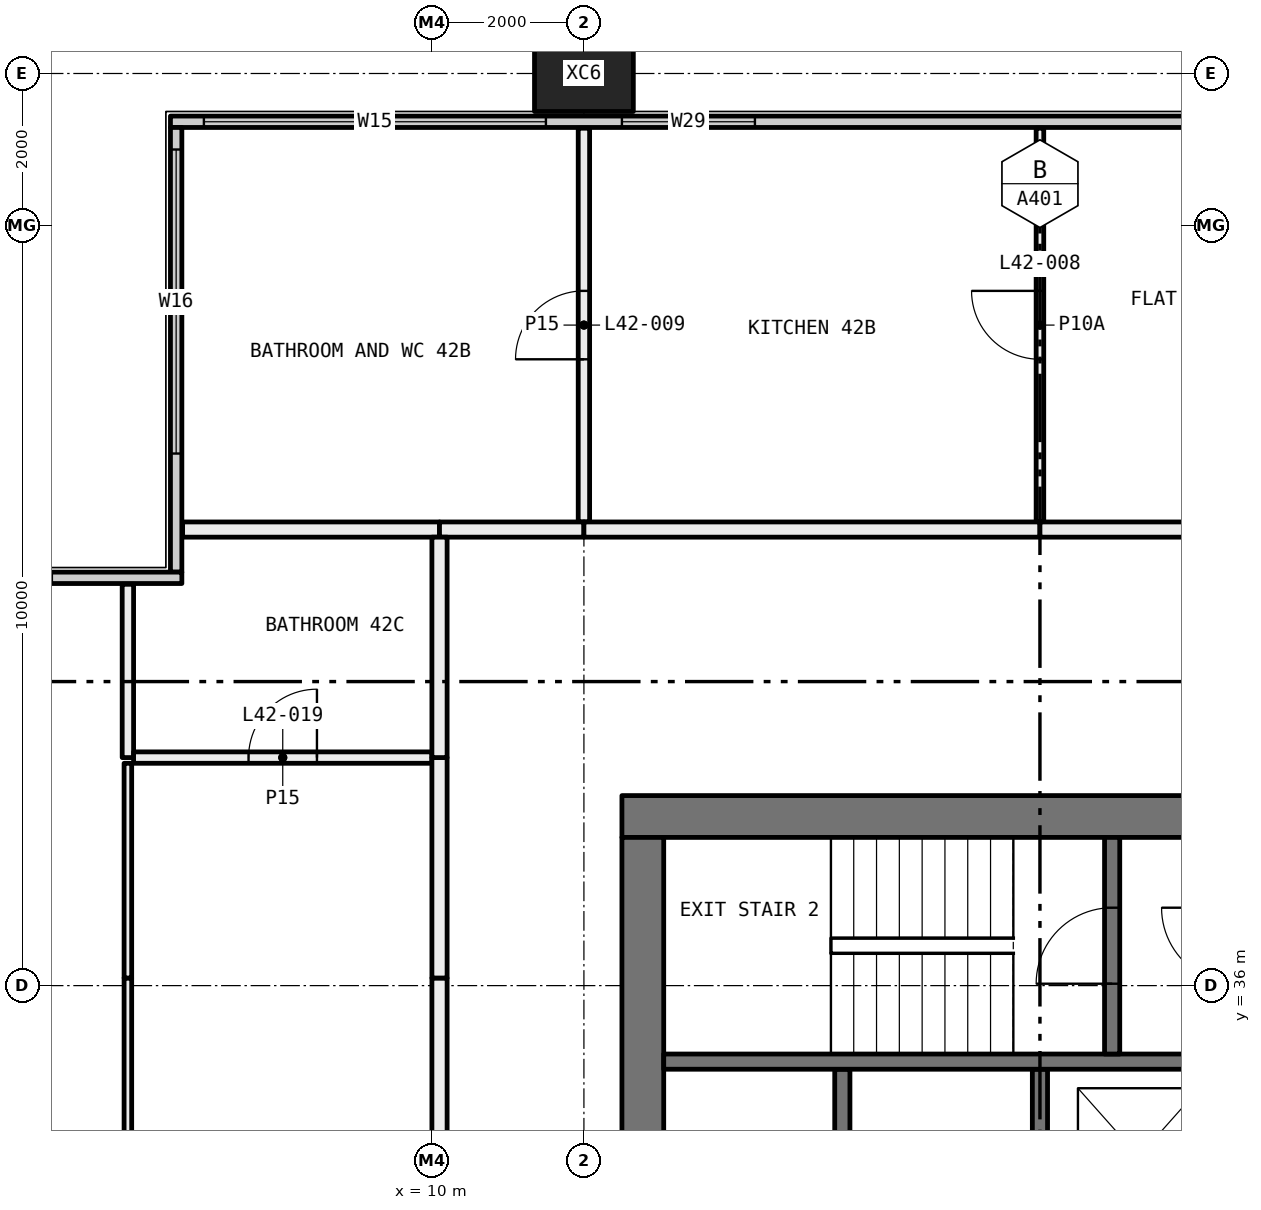
"""IFC4 building model, lengths in metres.
Left out: names, types, materials, properties, quantities, classifications, styles, units other than length and angle.
Written with IfcOpenShell. Run it as: python <this file> out.ifc"""

import sys

from ifc_helpers import new_model, si_unit, direction, frame, frame_2d, origin, origin_2d, place, context, subcontext, project, spatial, rectangle, hollow_rectangle, extrude, element, fill, save


model = new_model("IFC4")
c1 = context("Model", 3, precision=1e-05, world=origin(), true_north=direction((0.0, 1.0)))
c2 = subcontext(c1, "Body", "Model", "MODEL_VIEW")
j1 = project(units=[si_unit("LENGTHUNIT", "METRE"), si_unit("PLANEANGLEUNIT", "RADIAN")], contexts=[c1])
p1 = place(None, origin())
s1 = spatial("IfcSite", under=j1, at=p1, CompositionType="ELEMENT")
p2 = place(p1, origin())
s2 = spatial("IfcBuilding", under=s1, at=p2, CompositionType="ELEMENT")
p3 = place(p2, frame((0.0, 0.0, 161.7)))
s3 = spatial("IfcBuildingStorey", under=s2, at=p3, CompositionType="ELEMENT", Elevation=161.7)
p4 = place(p3, frame((12.0, 48.0, -0.4), z_axis=(0.0, 0.0, 1.0), x_axis=(1.0, 0.0, 0.0)))
e1 = element("IfcColumn", 1, at=p4, inside=s3, PredefinedType="COLUMN", context=c2, shape_type="SweptSolid", body=[
    extrude(hollow_rectangle(XDim=1.3, YDim=1.0, WallThickness=0.05, at=origin_2d()), origin(), (0.0, 0.0, 1.0), 3.45),
])
p5 = place(p3, frame((6.56, 47.365, 0.0), z_axis=(0.0, 0.0, 1.0), x_axis=(1.0, 0.0, 0.0)))
e2 = element("IfcWall", 2, at=p5, inside=s3, PredefinedType="ELEMENTEDWALL", context=c2, shape_type="SweptSolid", body=[
    extrude(rectangle(XDim=46.88, YDim=0.15, at=frame_2d((23.44, 0.0))), origin(), (0.0, 0.0, 1.0), 3.05),
])
p6 = place(p5, frame((0.44, 0.0, 0.45)))
e3 = element("IfcOpeningElement", 3, at=p6, cuts=e2, PredefinedType="OPENING", context=c2, shape_type="SweptSolid", body=[
    extrude(rectangle(XDim=4.5, YDim=2.55, at=frame_2d((2.25, 1.275))), frame((0.0, 0.085, 0.0), z_axis=(0.0, -1.0, 0.0), x_axis=(1.0, 0.0, 0.0)), (0.0, 0.0, 1.0), 0.17),
])
p7 = place(p5, frame((5.94, 0.0, 0.45)))
e4 = element("IfcOpeningElement", 4, at=p7, cuts=e2, PredefinedType="OPENING", context=c2, shape_type="SweptSolid", body=[
    extrude(rectangle(XDim=1.75, YDim=2.55, at=frame_2d((0.875, 1.275))), frame((0.0, 0.085, 0.0), z_axis=(0.0, -1.0, 0.0), x_axis=(1.0, 0.0, 0.0)), (0.0, 0.0, 1.0), 0.17),
])
p8 = place(p5, frame((15.19, 0.0, 0.45)))
e5 = element("IfcOpeningElement", 5, at=p8, cuts=e2, PredefinedType="OPENING", context=c2, shape_type="SweptSolid", body=[
    extrude(rectangle(XDim=1.75, YDim=2.55, at=frame_2d((0.875, 1.275))), frame((0.0, 0.085, 0.0), z_axis=(0.0, -1.0, 0.0), x_axis=(1.0, 0.0, 0.0)), (0.0, 0.0, 1.0), 0.17),
])
p9 = place(p5, frame((17.94, 0.0, 0.45)))
e6 = element("IfcOpeningElement", 6, at=p9, cuts=e2, PredefinedType="OPENING", context=c2, shape_type="SweptSolid", body=[
    extrude(rectangle(XDim=1.75, YDim=2.55, at=frame_2d((0.875, 1.275))), frame((0.0, 0.085, 0.0), z_axis=(0.0, -1.0, 0.0), x_axis=(1.0, 0.0, 0.0)), (0.0, 0.0, 1.0), 0.17),
])
p10 = place(p5, frame((27.19, 0.0, 0.45)))
e7 = element("IfcOpeningElement", 7, at=p10, cuts=e2, PredefinedType="OPENING", context=c2, shape_type="SweptSolid", body=[
    extrude(rectangle(XDim=1.75, YDim=2.55, at=frame_2d((0.875, 1.275))), frame((0.0, 0.085, 0.0), z_axis=(0.0, -1.0, 0.0), x_axis=(1.0, 0.0, 0.0)), (0.0, 0.0, 1.0), 0.17),
])
p11 = place(p5, frame((29.94, 0.0, 0.45)))
e8 = element("IfcOpeningElement", 8, at=p11, cuts=e2, PredefinedType="OPENING", context=c2, shape_type="SweptSolid", body=[
    extrude(rectangle(XDim=1.75, YDim=2.55, at=frame_2d((0.875, 1.275))), frame((0.0, 0.085, 0.0), z_axis=(0.0, -1.0, 0.0), x_axis=(1.0, 0.0, 0.0)), (0.0, 0.0, 1.0), 0.17),
])
p12 = place(p5, frame((39.19, 0.0, 0.45)))
e9 = element("IfcOpeningElement", 9, at=p12, cuts=e2, PredefinedType="OPENING", context=c2, shape_type="SweptSolid", body=[
    extrude(rectangle(XDim=1.75, YDim=2.55, at=frame_2d((0.875, 1.275))), frame((0.0, 0.085, 0.0), z_axis=(0.0, -1.0, 0.0), x_axis=(1.0, 0.0, 0.0)), (0.0, 0.0, 1.0), 0.17),
])
p13 = place(p5, frame((41.94, 0.0, 0.45)))
e10 = element("IfcOpeningElement", 10, at=p13, cuts=e2, PredefinedType="OPENING", context=c2, shape_type="SweptSolid", body=[
    extrude(rectangle(XDim=4.5, YDim=2.55, at=frame_2d((2.25, 1.275))), frame((0.0, 0.085, 0.0), z_axis=(0.0, -1.0, 0.0), x_axis=(1.0, 0.0, 0.0)), (0.0, 0.0, 1.0), 0.17),
])
p14 = place(p3, frame((6.635, 41.44, 0.0), z_axis=(0.0, 0.0, 1.0), x_axis=(0.0, 1.0, 0.0)))
e11 = element("IfcWall", 11, at=p14, inside=s3, PredefinedType="ELEMENTEDWALL", context=c2, shape_type="SweptSolid", body=[
    extrude(rectangle(XDim=5.85, YDim=0.15, at=frame_2d((2.925, 0.0))), origin(), (0.0, 0.0, 1.0), 3.05),
])
p15 = place(p14, frame((1.56, 0.0, 0.45)))
e12 = element("IfcOpeningElement", 12, at=p15, cuts=e11, PredefinedType="OPENING", context=c2, shape_type="SweptSolid", body=[
    extrude(rectangle(XDim=4.0, YDim=2.55, at=frame_2d((2.0, 1.275))), frame((0.0, 0.085, 0.0), z_axis=(0.0, -1.0, 0.0), x_axis=(1.0, 0.0, 0.0)), (0.0, 0.0, 1.0), 0.17),
])
p16 = place(p3, frame((0.56, 41.365, 0.0), z_axis=(0.0, 0.0, 1.0), x_axis=(1.0, 0.0, 0.0)))
e13 = element("IfcWall", 13, at=p16, inside=s3, PredefinedType="ELEMENTEDWALL", context=c2, shape_type="SweptSolid", body=[
    extrude(rectangle(XDim=6.15, YDim=0.15, at=frame_2d((3.075, 0.0))), origin(), (0.0, 0.0, 1.0), 3.05),
])
p17 = place(p16, frame((0.44, 0.0, 0.45)))
e14 = element("IfcOpeningElement", 14, at=p17, cuts=e13, PredefinedType="OPENING", context=c2, shape_type="SweptSolid", body=[
    extrude(rectangle(XDim=4.0, YDim=2.55, at=frame_2d((2.0, 1.275))), frame((0.0, 0.085, 0.0), z_axis=(0.0, -1.0, 0.0), x_axis=(1.0, 0.0, 0.0)), (0.0, 0.0, 1.0), 0.17),
])
p18 = place(p3, frame((12.0, 42.1, 0.0), z_axis=(0.0, 0.0, 1.0), x_axis=(0.0, 1.0, 0.0)))
e15 = element("IfcWall", 15, at=p18, inside=s3, PredefinedType="PARTITIONING", context=c2, shape_type="SweptSolid", body=[
    extrude(rectangle(XDim=5.18, YDim=0.15, at=frame_2d((2.59, 0.0))), origin(), (0.0, 0.0, 1.0), 3.05),
])
p19 = place(p18, frame((2.14, 0.0, 0.0)))
e16 = element("IfcOpeningElement", 16, at=p19, cuts=e15, PredefinedType="OPENING", context=c2, shape_type="SweptSolid", body=[
    extrude(rectangle(XDim=0.9, YDim=2.1, at=frame_2d((0.45, 1.05))), frame((0.0, 0.085, 0.0), z_axis=(0.0, -1.0, 0.0), x_axis=(1.0, 0.0, 0.0)), (0.0, 0.0, 1.0), 0.17),
])
p20 = place(p3, frame((6.72, 42.0, 0.0), z_axis=(0.0, 0.0, 1.0), x_axis=(1.0, 0.0, 0.0)))
e17 = element("IfcWall", 17, at=p20, inside=s3, PredefinedType="PARTITIONING", context=c2, shape_type="SweptSolid", body=[
    extrude(rectangle(XDim=3.38, YDim=0.2, at=frame_2d((1.69, 0.0))), origin(), (0.0, 0.0, 1.0), 3.05),
])
p21 = place(p3, frame((10.1, 42.0, 0.0), z_axis=(0.0, 0.0, 1.0), x_axis=(1.0, 0.0, 0.0)))
e18 = element("IfcWall", 18, at=p21, inside=s3, PredefinedType="PARTITIONING", context=c2, shape_type="SweptSolid", body=[
    extrude(rectangle(XDim=1.9, YDim=0.2, at=frame_2d((0.95, 0.0))), origin(), (0.0, 0.0, 1.0), 3.05),
])
p22 = place(p3, frame((18.0, 42.1, 0.0), z_axis=(0.0, 0.0, 1.0), x_axis=(0.0, 1.0, 0.0)))
e19 = element("IfcWall", 19, at=p22, inside=s3, PredefinedType="PARTITIONING", context=c2, shape_type="SweptSolid", body=[
    extrude(rectangle(XDim=5.18, YDim=0.1, at=frame_2d((2.59, 0.0))), origin(), (0.0, 0.0, 1.0), 3.05),
])
p23 = place(p22, frame((2.14, 0.0, 0.0)))
e20 = element("IfcOpeningElement", 20, at=p23, cuts=e19, PredefinedType="OPENING", context=c2, shape_type="SweptSolid", body=[
    extrude(rectangle(XDim=0.9, YDim=2.1, at=frame_2d((0.45, 1.05))), frame((0.0, 0.06, 0.0), z_axis=(0.0, -1.0, 0.0), x_axis=(1.0, 0.0, 0.0)), (0.0, 0.0, 1.0), 0.12),
])
p24 = place(p3, frame((12.0, 42.0, 0.0), z_axis=(0.0, 0.0, 1.0), x_axis=(1.0, 0.0, 0.0)))
e21 = element("IfcWall", 21, at=p24, inside=s3, PredefinedType="PARTITIONING", context=c2, shape_type="SweptSolid", body=[
    extrude(rectangle(XDim=6.0, YDim=0.2, at=frame_2d((3.0, 0.0))), origin(), (0.0, 0.0, 1.0), 3.05),
])
p25 = place(p3, frame((18.0, 42.0, 0.0), z_axis=(0.0, 0.0, 1.0), x_axis=(1.0, 0.0, 0.0)))
e22 = element("IfcWall", 22, at=p25, inside=s3, PredefinedType="PARTITIONING", context=c2, shape_type="SweptSolid", body=[
    extrude(rectangle(XDim=6.0, YDim=0.2, at=frame_2d((3.0, 0.0))), origin(), (0.0, 0.0, 1.0), 3.05),
])
p26 = place(p25, frame((2.5, 0.0, 0.0)))
e23 = element("IfcOpeningElement", 23, at=p26, cuts=e22, PredefinedType="OPENING", context=c2, shape_type="SweptSolid", body=[
    extrude(rectangle(XDim=1.0, YDim=2.1, at=frame_2d((0.5, 1.05))), frame((0.0, 0.11, 0.0), z_axis=(0.0, -1.0, 0.0), x_axis=(1.0, 0.0, 0.0)), (0.0, 0.0, 1.0), 0.22),
])
p27 = place(p3, frame((6.0, 30.05, 0.0), z_axis=(0.0, 0.0, 1.0), x_axis=(0.0, 1.0, 0.0)))
e24 = element("IfcWall", 24, at=p27, inside=s3, PredefinedType="PARTITIONING", context=c2, shape_type="SweptSolid", body=[
    extrude(rectangle(XDim=6.05, YDim=0.1, at=frame_2d((3.025, 0.0))), origin(), (0.0, 0.0, 1.0), 2.45),
])
p28 = place(p3, frame((6.0, 36.1, 0.0), z_axis=(0.0, 0.0, 1.0), x_axis=(0.0, 1.0, 0.0)))
e25 = element("IfcWall", 25, at=p28, inside=s3, PredefinedType="PARTITIONING", context=c2, shape_type="SweptSolid", body=[
    extrude(rectangle(XDim=2.825, YDim=0.1, at=frame_2d((1.413, 0.0))), origin(), (0.0, 0.0, 1.0), 3.05),
])
p29 = place(p3, frame((6.0, 39.0, 0.0), z_axis=(0.0, 0.0, 1.0), x_axis=(0.0, 1.0, 0.0)))
e26 = element("IfcWall", 26, at=p29, inside=s3, PredefinedType="PARTITIONING", context=c2, shape_type="SweptSolid", body=[
    extrude(rectangle(XDim=2.28, YDim=0.15, at=frame_2d((1.14, 0.0))), origin(), (0.0, 0.0, 1.0), 3.05),
])
p30 = place(p3, frame((10.0, 39.0, 0.0), z_axis=(0.0, 0.0, 1.0), x_axis=(-1.0, 0.0, 0.0)))
e27 = element("IfcWall", 27, at=p30, inside=s3, PredefinedType="PARTITIONING", context=c2, shape_type="SweptSolid", body=[
    extrude(rectangle(XDim=3.925, YDim=0.15, at=frame_2d((1.962, 0.0))), origin(), (0.0, 0.0, 1.0), 3.05),
])
p31 = place(p30, frame((1.512, 0.0, 0.0)))
e28 = element("IfcOpeningElement", 28, at=p31, cuts=e27, PredefinedType="OPENING", context=c2, shape_type="SweptSolid", body=[
    extrude(rectangle(XDim=0.9, YDim=2.1, at=frame_2d((0.45, 1.05))), frame((0.0, 0.085, 0.0), z_axis=(0.0, -1.0, 0.0), x_axis=(1.0, 0.0, 0.0)), (0.0, 0.0, 1.0), 0.17),
])
p32 = place(p3, frame((10.1, 25.5, 0.0), z_axis=(0.0, 0.0, 1.0), x_axis=(0.0, 1.0, 0.0)))
e29 = element("IfcWall", 29, at=p32, inside=s3, PredefinedType="PARTITIONING", context=c2, shape_type="SweptSolid", body=[
    extrude(rectangle(XDim=10.6, YDim=0.2, at=frame_2d((5.3, 0.0))), origin(), (0.0, 0.0, 1.0), 2.45),
])
for number, where, z_axis, x_axis in (
    (30, (10.1, 36.1, 0.0), (0.0, 0.0, 1.0), (0.0, 1.0, 0.0)),
    (31, (10.1, 39.0, 0.0), (0.0, 0.0, 1.0), (0.0, 1.0, 0.0)),
):
    element("IfcWall", number, at=place(p3, frame(where, z_axis=z_axis, x_axis=x_axis)), inside=s3, PredefinedType="PARTITIONING", context=c2, shape_type="SweptSolid", body=[
        extrude(rectangle(XDim=2.9, YDim=0.2, at=frame_2d((1.45, 0.0))), origin(), (0.0, 0.0, 1.0), 3.05),
    ])
p33 = place(p3, frame((12.5, 38.225, 0.0), z_axis=(0.0, 0.0, 1.0), x_axis=(1.0, 0.0, 0.0)))
e32 = element("IfcWall", 32, at=p33, inside=s3, PredefinedType="SHEAR", context=c2, shape_type="SweptSolid", body=[
    extrude(rectangle(XDim=11.0, YDim=0.55, at=frame_2d((5.5, 0.0))), origin(), (0.0, 0.0, 1.0), 3.05),
])
p34 = place(p33, frame((8.525, 0.0, 0.0)))
e33 = element("IfcOpeningElement", 33, at=p34, cuts=e32, PredefinedType="OPENING", context=c2, shape_type="SweptSolid", body=[
    extrude(rectangle(XDim=1.6, YDim=2.1, at=frame_2d((0.8, 1.05))), frame((0.0, 0.285, 0.0), z_axis=(0.0, -1.0, 0.0), x_axis=(1.0, 0.0, 0.0)), (0.0, 0.0, 1.0), 0.57),
])
p35 = place(p3, frame((12.775, 22.05, 0.0), z_axis=(0.0, 0.0, 1.0), x_axis=(0.0, 1.0, 0.0)))
e34 = element("IfcWall", 34, at=p35, inside=s3, PredefinedType="SHEAR", context=c2, shape_type="SweptSolid", body=[
    extrude(rectangle(XDim=15.9, YDim=0.55, at=frame_2d((7.95, 0.0))), origin(), (0.0, 0.0, 1.0), 3.05),
])
p36 = place(p35, frame((8.4, 0.0, 0.0)))
e35 = element("IfcOpeningElement", 35, at=p36, cuts=e34, PredefinedType="OPENING", context=c2, shape_type="SweptSolid", body=[
    extrude(rectangle(XDim=1.6, YDim=2.1, at=frame_2d((0.8, 1.05))), frame((0.0, 0.285, 0.0), z_axis=(0.0, -1.0, 0.0), x_axis=(1.0, 0.0, 0.0)), (0.0, 0.0, 1.0), 0.57),
])
p37 = place(p35, frame((2.175, 0.0, 0.0)))
e36 = element("IfcOpeningElement", 36, at=p37, cuts=e34, PredefinedType="OPENING", context=c2, shape_type="SweptSolid", body=[
    extrude(rectangle(XDim=1.0, YDim=2.1, at=frame_2d((0.5, 1.05))), frame((0.0, 0.285, 0.0), z_axis=(0.0, -1.0, 0.0), x_axis=(1.0, 0.0, 0.0)), (0.0, 0.0, 1.0), 0.57),
])
p38 = place(p3, frame((15.4, 22.05, 0.0), z_axis=(0.0, 0.0, 1.0), x_axis=(0.0, 1.0, 0.0)))
e37 = element("IfcWall", 37, at=p38, inside=s3, PredefinedType="SOLIDWALL", context=c2, shape_type="SweptSolid", body=[
    extrude(rectangle(XDim=12.85, YDim=0.2, at=frame_2d((6.425, 0.0))), origin(), (0.0, 0.0, 1.0), 3.05),
])
p39 = place(p38, frame((3.65, 0.0, 0.0)))
e38 = element("IfcOpeningElement", 38, at=p39, cuts=e37, PredefinedType="OPENING", context=c2, shape_type="SweptSolid", body=[
    extrude(rectangle(XDim=1.1, YDim=2.1, at=frame_2d((0.55, 1.05))), frame((0.0, 0.11, 0.0), z_axis=(0.0, -1.0, 0.0), x_axis=(1.0, 0.0, 0.0)), (0.0, 0.0, 1.0), 0.22),
])
p40 = place(p38, frame((0.15, 0.0, 0.0)))
e39 = element("IfcOpeningElement", 39, at=p40, cuts=e37, PredefinedType="OPENING", context=c2, shape_type="SweptSolid", body=[
    extrude(rectangle(XDim=1.0, YDim=2.1, at=frame_2d((0.5, 1.05))), frame((0.0, 0.11, 0.0), z_axis=(0.0, -1.0, 0.0), x_axis=(1.0, 0.0, 0.0)), (0.0, 0.0, 1.0), 0.22),
])
p41 = place(p38, frame((8.75, 0.0, 0.0)))
e40 = element("IfcOpeningElement", 40, at=p41, cuts=e37, PredefinedType="OPENING", context=c2, shape_type="SweptSolid", body=[
    extrude(rectangle(XDim=0.9, YDim=2.1, at=frame_2d((0.45, 1.05))), frame((0.0, 0.11, 0.0), z_axis=(0.0, -1.0, 0.0), x_axis=(1.0, 0.0, 0.0)), (0.0, 0.0, 1.0), 0.22),
])
p42 = place(p3, frame((18.0, 25.1, 0.0), z_axis=(0.0, 0.0, 1.0), x_axis=(0.0, 1.0, 0.0)))
e41 = element("IfcWall", 41, at=p42, inside=s3, PredefinedType="SOLIDWALL", context=c2, shape_type="SweptSolid", body=[
    extrude(rectangle(XDim=9.8, YDim=0.2, at=frame_2d((4.9, 0.0))), origin(), (0.0, 0.0, 1.0), 3.05),
])
p43 = place(p3, frame((13.05, 35.0, 0.0), z_axis=(0.0, 0.0, 1.0), x_axis=(1.0, 0.0, 0.0)))
e42 = element("IfcWall", 42, at=p43, inside=s3, PredefinedType="SOLIDWALL", context=c2, shape_type="SweptSolid", body=[
    extrude(rectangle(XDim=7.45, YDim=0.2, at=frame_2d((3.725, 0.0))), origin(), (0.0, 0.0, 1.0), 3.05),
])
p44 = place(p3, frame((18.95, 35.1, 0.0), z_axis=(0.0, 0.0, 1.0), x_axis=(0.0, 1.0, 0.0)))
e43 = element("IfcWall", 43, at=p44, inside=s3, PredefinedType="SOLIDWALL", context=c2, shape_type="SweptSolid", body=[
    extrude(rectangle(XDim=2.85, YDim=0.2, at=frame_2d((1.425, 0.0))), origin(), (0.0, 0.0, 1.0), 3.05),
])
p45 = place(p44, frame((0.925, 0.0, 0.0)))
e44 = element("IfcOpeningElement", 44, at=p45, cuts=e43, PredefinedType="OPENING", context=c2, shape_type="SweptSolid", body=[
    extrude(rectangle(XDim=1.0, YDim=2.1, at=frame_2d((0.5, 1.05))), frame((0.0, 0.11, 0.0), z_axis=(0.0, -1.0, 0.0), x_axis=(1.0, 0.0, 0.0)), (0.0, 0.0, 1.0), 0.22),
])
p46 = place(p6, origin())
e45 = element("IfcWindow", 45, at=p46, inside=s3, PartitioningType="SINGLE_PANEL", PredefinedType="WINDOW", context=c2, shape_type="SweptSolid", body=[
    extrude(rectangle(XDim=4.5, YDim=2.55, at=frame_2d((2.25, 1.275))), frame((0.0, 0.03, 0.0), z_axis=(0.0, -1.0, 0.0), x_axis=(1.0, 0.0, 0.0)), (0.0, 0.0, 1.0), 0.06),
])
fill(e3, e45)
p47 = place(p7, origin())
e46 = element("IfcWindow", 46, at=p47, inside=s3, PartitioningType="SINGLE_PANEL", PredefinedType="WINDOW", context=c2, shape_type="SweptSolid", body=[
    extrude(rectangle(XDim=1.75, YDim=2.55, at=frame_2d((0.875, 1.275))), frame((0.0, 0.03, 0.0), z_axis=(0.0, -1.0, 0.0), x_axis=(1.0, 0.0, 0.0)), (0.0, 0.0, 1.0), 0.06),
])
fill(e4, e46)
p48 = place(p15, origin())
e47 = element("IfcWindow", 47, at=p48, inside=s3, PartitioningType="SINGLE_PANEL", PredefinedType="WINDOW", context=c2, shape_type="SweptSolid", body=[
    extrude(rectangle(XDim=4.0, YDim=2.55, at=frame_2d((2.0, 1.275))), frame((0.0, 0.03, 0.0), z_axis=(0.0, -1.0, 0.0), x_axis=(1.0, 0.0, 0.0)), (0.0, 0.0, 1.0), 0.06),
])
fill(e12, e47)
p49 = place(p23, origin())
e48 = element("IfcDoor", 48, at=p49, inside=s3, OperationType="SINGLE_SWING_LEFT", PredefinedType="DOOR", context=c2, shape_type="SweptSolid", body=[
    extrude(rectangle(XDim=0.9, YDim=2.1, at=frame_2d((0.45, 1.05))), frame((0.0, 0.025, 0.0), z_axis=(0.0, -1.0, 0.0), x_axis=(1.0, 0.0, 0.0)), (0.0, 0.0, 1.0), 0.05),
])
fill(e20, e48)
p50 = place(p19, origin())
e49 = element("IfcDoor", 49, at=p50, inside=s3, OperationType="SINGLE_SWING_RIGHT", PredefinedType="DOOR", context=c2, shape_type="SweptSolid", body=[
    extrude(rectangle(XDim=0.9, YDim=2.1, at=frame_2d((0.45, 1.05))), frame((0.0, 0.025, 0.0), z_axis=(0.0, -1.0, 0.0), x_axis=(1.0, 0.0, 0.0)), (0.0, 0.0, 1.0), 0.05),
])
fill(e16, e49)
p51 = place(p31, frame((0.9, 0.0, 0.0), x_axis=(-1.0, 0.0, 0.0)))
e50 = element("IfcDoor", 50, at=p51, inside=s3, OperationType="SINGLE_SWING_LEFT", PredefinedType="DOOR", context=c2, shape_type="SweptSolid", body=[
    extrude(rectangle(XDim=0.9, YDim=2.1, at=frame_2d((0.45, 1.05))), frame((0.0, 0.025, 0.0), z_axis=(0.0, -1.0, 0.0), x_axis=(1.0, 0.0, 0.0)), (0.0, 0.0, 1.0), 0.05),
])
fill(e28, e50)
p52 = place(p45, origin())
e51 = element("IfcDoor", 51, at=p52, inside=s3, OperationType="SINGLE_SWING_RIGHT", PredefinedType="DOOR", context=c2, shape_type="SweptSolid", body=[
    extrude(rectangle(XDim=1.0, YDim=2.1, at=frame_2d((0.5, 1.05))), frame((0.0, 0.025, 0.0), z_axis=(0.0, -1.0, 0.0), x_axis=(1.0, 0.0, 0.0)), (0.0, 0.0, 1.0), 0.05),
])
fill(e44, e51)
save(model, sys.argv[1])
